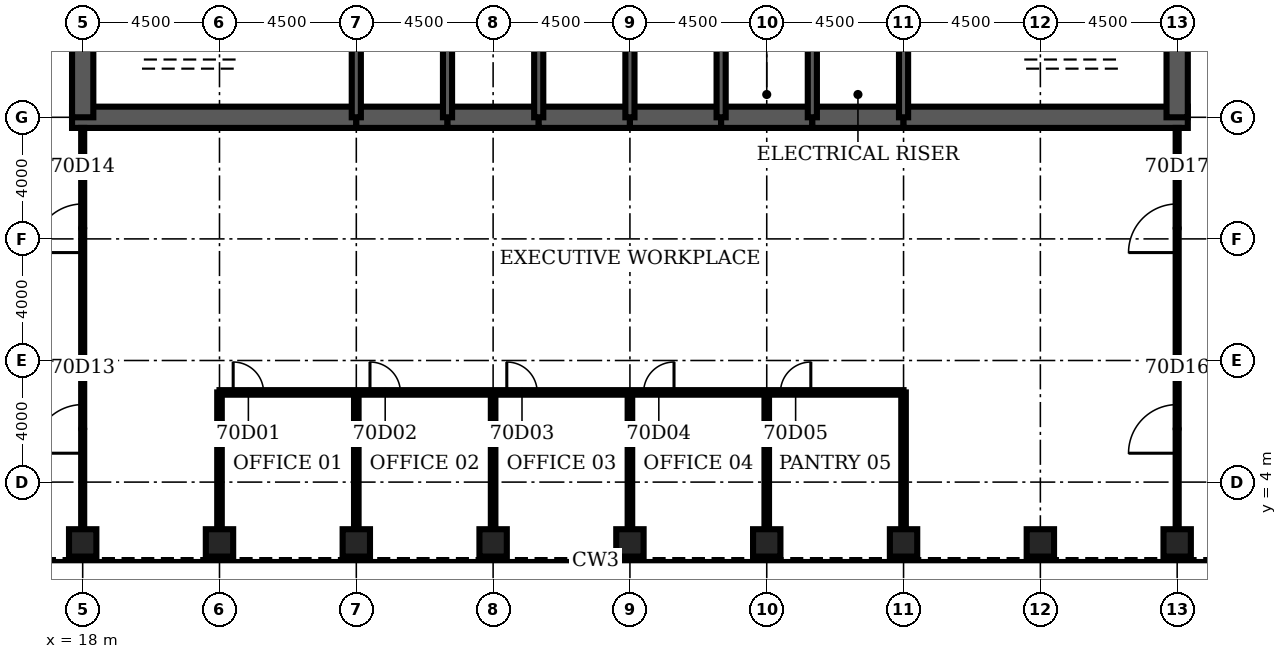
"""IFC4 building model, lengths in metres.
Left out: names, types, materials, properties, quantities, classifications, styles, units other than length and angle.
Written with IfcOpenShell. Run it as: python <this file> out.ifc"""

import sys

from ifc_helpers import new_model, si_unit, direction, frame, frame_2d, origin, origin_2d, place, context, subcontext, project, spatial, rectangle, hollow_rectangle, extrude, element, fill, save


model = new_model("IFC4")
c1 = context("Model", 3, precision=1e-05, world=origin(), true_north=direction((0.0, 1.0)))
c2 = subcontext(c1, "Body", "Model", "MODEL_VIEW")
j1 = project(units=[si_unit("LENGTHUNIT", "METRE"), si_unit("PLANEANGLEUNIT", "RADIAN")], contexts=[c1])
p1 = place(None, origin())
s1 = spatial("IfcSite", under=j1, at=p1, CompositionType="ELEMENT")
p2 = place(p1, origin())
s2 = spatial("IfcBuilding", under=s1, at=p2, CompositionType="ELEMENT")
p3 = place(p2, frame((0.0, 0.0, 308.9)))
s3 = spatial("IfcBuildingStorey", under=s2, at=p3, CompositionType="ELEMENT", Elevation=308.9)
for number, where, z_axis, x_axis in (
    (1, (18.0, 2.0, 0.0), (0.0, 0.0, 1.0), (0.0, 1.0, 0.0)),
    (2, (22.5, 2.0, 0.0), (0.0, 0.0, 1.0), (0.0, 1.0, 0.0)),
    (3, (27.0, 2.0, 0.0), (0.0, 0.0, 1.0), (0.0, 1.0, 0.0)),
    (4, (31.5, 2.0, 0.0), (0.0, 0.0, 1.0), (0.0, 1.0, 0.0)),
    (5, (36.0, 2.0, 0.0), (0.0, 0.0, 1.0), (0.0, 1.0, 0.0)),
    (6, (40.5, 2.0, 0.0), (0.0, 0.0, 1.0), (0.0, 1.0, 0.0)),
    (7, (45.0, 2.0, 0.0), (0.0, 0.0, 1.0), (0.0, 1.0, 0.0)),
    (8, (49.5, 2.0, 0.0), (0.0, 0.0, 1.0), (0.0, 1.0, 0.0)),
    (9, (54.0, 2.0, 0.0), (0.0, 0.0, 1.0), (0.0, 1.0, 0.0)),
):
    element("IfcColumn", number, at=place(p3, frame(where, z_axis=z_axis, x_axis=x_axis)), inside=s3, PredefinedType="COLUMN", context=c2, shape_type="SweptSolid", body=[
        extrude(hollow_rectangle(XDim=0.9, YDim=0.9, WallThickness=0.06, at=origin_2d()), origin(), (0.0, 0.0, 1.0), 4.2),
    ])
p4 = place(p3, frame((17.65, 16.0, 0.0), z_axis=(0.0, 0.0, 1.0), x_axis=(1.0, 0.0, 0.0)))
e10 = element("IfcWall", 10, at=p4, inside=s3, PredefinedType="SHEAR", context=c2, shape_type="SweptSolid", body=[
    extrude(rectangle(XDim=9.35, YDim=0.7, at=frame_2d((4.675, 0.0))), origin(), (0.0, 0.0, 1.0), 4.2),
])
for number, where, z_axis, x_axis in (
    (11, (27.0, 16.0, 0.0), (0.0, 0.0, 1.0), (1.0, 0.0, 0.0)),
    (12, (30.0, 16.0, 0.0), (0.0, 0.0, 1.0), (1.0, 0.0, 0.0)),
    (13, (33.0, 16.0, 0.0), (0.0, 0.0, 1.0), (1.0, 0.0, 0.0)),
    (14, (36.0, 16.0, 0.0), (0.0, 0.0, 1.0), (1.0, 0.0, 0.0)),
    (15, (39.0, 16.0, 0.0), (0.0, 0.0, 1.0), (1.0, 0.0, 0.0)),
    (16, (42.0, 16.0, 0.0), (0.0, 0.0, 1.0), (1.0, 0.0, 0.0)),
):
    element("IfcWall", number, at=place(p3, frame(where, z_axis=z_axis, x_axis=x_axis)), inside=s3, PredefinedType="SHEAR", context=c2, shape_type="SweptSolid", body=[
        extrude(rectangle(XDim=3.0, YDim=0.7, at=frame_2d((1.5, 0.0))), origin(), (0.0, 0.0, 1.0), 4.2),
    ])
p5 = place(p3, frame((45.0, 16.0, 0.0), z_axis=(0.0, 0.0, 1.0), x_axis=(1.0, 0.0, 0.0)))
e17 = element("IfcWall", 17, at=p5, inside=s3, PredefinedType="SHEAR", context=c2, shape_type="SweptSolid", body=[
    extrude(rectangle(XDim=9.35, YDim=0.7, at=frame_2d((4.675, 0.0))), origin(), (0.0, 0.0, 1.0), 4.2),
])
for number, where, z_axis, x_axis in (
    (18, (18.0, 19.2, 0.0), (0.0, 0.0, 1.0), (0.0, -1.0, 0.0)),
    (19, (54.0, 16.0, 0.0), (0.0, 0.0, 1.0), (0.0, 1.0, 0.0)),
):
    element("IfcWall", number, at=place(p3, frame(where, z_axis=z_axis, x_axis=x_axis)), inside=s3, PredefinedType="SHEAR", context=c2, shape_type="SweptSolid", body=[
        extrude(rectangle(XDim=3.2, YDim=0.7, at=frame_2d((1.6, 0.0))), origin(), (0.0, 0.0, 1.0), 4.2),
    ])
for number, where, z_axis, x_axis in (
    (20, (27.0, 16.0, 0.0), (0.0, 0.0, 1.0), (0.0, 1.0, 0.0)),
    (21, (30.0, 16.0, 0.0), (0.0, 0.0, 1.0), (0.0, 1.0, 0.0)),
    (22, (33.0, 16.0, 0.0), (0.0, 0.0, 1.0), (0.0, 1.0, 0.0)),
    (23, (36.0, 16.0, 0.0), (0.0, 0.0, 1.0), (0.0, 1.0, 0.0)),
    (24, (39.0, 16.0, 0.0), (0.0, 0.0, 1.0), (0.0, 1.0, 0.0)),
    (25, (42.0, 16.0, 0.0), (0.0, 0.0, 1.0), (0.0, 1.0, 0.0)),
    (26, (45.0, 16.0, 0.0), (0.0, 0.0, 1.0), (0.0, 1.0, 0.0)),
):
    element("IfcWall", number, at=place(p3, frame(where, z_axis=z_axis, x_axis=x_axis)), inside=s3, PredefinedType="SOLIDWALL", context=c2, shape_type="SweptSolid", body=[
        extrude(rectangle(XDim=3.2, YDim=0.3, at=frame_2d((1.6, 0.0))), origin(), (0.0, 0.0, 1.0), 4.2),
    ])
p6 = place(p3, frame((39.15, 17.3, 0.0), z_axis=(0.0, 0.0, 1.0), x_axis=(1.0, 0.0, 0.0)))
e27 = element("IfcWall", 27, at=p6, inside=s3, PredefinedType="SOLIDWALL", context=c2, shape_type="SweptSolid", body=[
    extrude(rectangle(XDim=2.7, YDim=0.3, at=frame_2d((1.35, 0.0))), origin(), (0.0, 0.0, 1.0), 4.04),
])
p7 = place(p6, frame((0.85, 0.0, 0.0)))
e28 = element("IfcOpeningElement", 28, at=p7, cuts=e27, PredefinedType="OPENING", context=c2, shape_type="SweptSolid", body=[
    extrude(rectangle(XDim=1.0, YDim=2.1, at=frame_2d((0.5, 1.05))), frame((0.0, 0.16, 0.0), z_axis=(0.0, -1.0, 0.0), x_axis=(1.0, 0.0, 0.0)), (0.0, 0.0, 1.0), 0.32),
])
p8 = place(p3, frame((42.15, 17.3, 0.0), z_axis=(0.0, 0.0, 1.0), x_axis=(1.0, 0.0, 0.0)))
e29 = element("IfcWall", 29, at=p8, inside=s3, PredefinedType="SOLIDWALL", context=c2, shape_type="SweptSolid", body=[
    extrude(rectangle(XDim=2.7, YDim=0.3, at=frame_2d((1.35, 0.0))), origin(), (0.0, 0.0, 1.0), 4.04),
])
p9 = place(p8, frame((0.85, 0.0, 0.0)))
e30 = element("IfcOpeningElement", 30, at=p9, cuts=e29, PredefinedType="OPENING", context=c2, shape_type="SweptSolid", body=[
    extrude(rectangle(XDim=1.0, YDim=2.1, at=frame_2d((0.5, 1.05))), frame((0.0, 0.16, 0.0), z_axis=(0.0, -1.0, 0.0), x_axis=(1.0, 0.0, 0.0)), (0.0, 0.0, 1.0), 0.32),
])
p10 = place(p3, frame((22.5, 6.95, 0.0), z_axis=(0.0, 0.0, 1.0), x_axis=(1.0, 0.0, 0.0)))
e31 = element("IfcWall", 31, at=p10, inside=s3, PredefinedType="PARTITIONING", context=c2, shape_type="SweptSolid", body=[
    extrude(rectangle(XDim=22.5, YDim=0.15, at=frame_2d((11.25, 0.0))), origin(), (0.0, 0.0, 1.0), 3.0),
])
p11 = place(p10, frame((0.45, 0.0, 0.0)))
e32 = element("IfcOpeningElement", 32, at=p11, cuts=e31, PredefinedType="OPENING", context=c2, shape_type="SweptSolid", body=[
    extrude(rectangle(XDim=1.0, YDim=2.1, at=frame_2d((0.5, 1.05))), frame((0.0, 0.085, 0.0), z_axis=(0.0, -1.0, 0.0), x_axis=(1.0, 0.0, 0.0)), (0.0, 0.0, 1.0), 0.17),
])
p12 = place(p10, frame((4.95, 0.0, 0.0)))
e33 = element("IfcOpeningElement", 33, at=p12, cuts=e31, PredefinedType="OPENING", context=c2, shape_type="SweptSolid", body=[
    extrude(rectangle(XDim=1.0, YDim=2.1, at=frame_2d((0.5, 1.05))), frame((0.0, 0.085, 0.0), z_axis=(0.0, -1.0, 0.0), x_axis=(1.0, 0.0, 0.0)), (0.0, 0.0, 1.0), 0.17),
])
p13 = place(p10, frame((9.45, 0.0, 0.0)))
e34 = element("IfcOpeningElement", 34, at=p13, cuts=e31, PredefinedType="OPENING", context=c2, shape_type="SweptSolid", body=[
    extrude(rectangle(XDim=1.0, YDim=2.1, at=frame_2d((0.5, 1.05))), frame((0.0, 0.085, 0.0), z_axis=(0.0, -1.0, 0.0), x_axis=(1.0, 0.0, 0.0)), (0.0, 0.0, 1.0), 0.17),
])
p14 = place(p10, frame((13.95, 0.0, 0.0)))
e35 = element("IfcOpeningElement", 35, at=p14, cuts=e31, PredefinedType="OPENING", context=c2, shape_type="SweptSolid", body=[
    extrude(rectangle(XDim=1.0, YDim=2.1, at=frame_2d((0.5, 1.05))), frame((0.0, 0.085, 0.0), z_axis=(0.0, -1.0, 0.0), x_axis=(1.0, 0.0, 0.0)), (0.0, 0.0, 1.0), 0.17),
])
p15 = place(p10, frame((18.45, 0.0, 0.0)))
e36 = element("IfcOpeningElement", 36, at=p15, cuts=e31, PredefinedType="OPENING", context=c2, shape_type="SweptSolid", body=[
    extrude(rectangle(XDim=1.0, YDim=2.1, at=frame_2d((0.5, 1.05))), frame((0.0, 0.085, 0.0), z_axis=(0.0, -1.0, 0.0), x_axis=(1.0, 0.0, 0.0)), (0.0, 0.0, 1.0), 0.17),
])
p16 = place(p3, frame((18.0, 2.45, 0.0), z_axis=(0.0, 0.0, 1.0), x_axis=(0.0, 1.0, 0.0)))
e37 = element("IfcWall", 37, at=p16, inside=s3, PredefinedType="PARTITIONING", context=c2, shape_type="SweptSolid", body=[
    extrude(rectangle(XDim=13.2, YDim=0.1, at=frame_2d((6.6, 0.0))), origin(), (0.0, 0.0, 1.0), 3.0),
])
p17 = place(p16, frame((2.5, 0.0, 0.0)))
e38 = element("IfcOpeningElement", 38, at=p17, cuts=e37, PredefinedType="OPENING", context=c2, shape_type="SweptSolid", body=[
    extrude(rectangle(XDim=1.6, YDim=2.1, at=frame_2d((0.8, 1.05))), frame((0.0, 0.06, 0.0), z_axis=(0.0, -1.0, 0.0), x_axis=(1.0, 0.0, 0.0)), (0.0, 0.0, 1.0), 0.12),
])
p18 = place(p16, frame((9.1, 0.0, 0.0)))
e39 = element("IfcOpeningElement", 39, at=p18, cuts=e37, PredefinedType="OPENING", context=c2, shape_type="SweptSolid", body=[
    extrude(rectangle(XDim=1.6, YDim=2.1, at=frame_2d((0.8, 1.05))), frame((0.0, 0.06, 0.0), z_axis=(0.0, -1.0, 0.0), x_axis=(1.0, 0.0, 0.0)), (0.0, 0.0, 1.0), 0.12),
])
for number, where, z_axis, x_axis in (
    (40, (22.5, 2.45, 0.0), (0.0, 0.0, 1.0), (0.0, 1.0, 0.0)),
    (41, (27.0, 2.45, 0.0), (0.0, 0.0, 1.0), (0.0, 1.0, 0.0)),
    (42, (31.5, 2.45, 0.0), (0.0, 0.0, 1.0), (0.0, 1.0, 0.0)),
    (43, (36.0, 2.45, 0.0), (0.0, 0.0, 1.0), (0.0, 1.0, 0.0)),
    (44, (40.5, 2.45, 0.0), (0.0, 0.0, 1.0), (0.0, 1.0, 0.0)),
    (45, (45.0, 2.45, 0.0), (0.0, 0.0, 1.0), (0.0, 1.0, 0.0)),
):
    element("IfcWall", number, at=place(p3, frame(where, z_axis=z_axis, x_axis=x_axis)), inside=s3, PredefinedType="PARTITIONING", context=c2, shape_type="SweptSolid", body=[
        extrude(rectangle(XDim=4.5, YDim=0.15, at=frame_2d((2.25, 0.0))), origin(), (0.0, 0.0, 1.0), 3.0),
    ])
p19 = place(p3, frame((54.0, 2.45, 0.0), z_axis=(0.0, 0.0, 1.0), x_axis=(0.0, 1.0, 0.0)))
e46 = element("IfcWall", 46, at=p19, inside=s3, PredefinedType="PARTITIONING", context=c2, shape_type="SweptSolid", body=[
    extrude(rectangle(XDim=13.2, YDim=0.1, at=frame_2d((6.6, 0.0))), origin(), (0.0, 0.0, 1.0), 3.0),
])
p20 = place(p19, frame((2.5, 0.0, 0.0)))
e47 = element("IfcOpeningElement", 47, at=p20, cuts=e46, PredefinedType="OPENING", context=c2, shape_type="SweptSolid", body=[
    extrude(rectangle(XDim=1.6, YDim=2.1, at=frame_2d((0.8, 1.05))), frame((0.0, 0.06, 0.0), z_axis=(0.0, -1.0, 0.0), x_axis=(1.0, 0.0, 0.0)), (0.0, 0.0, 1.0), 0.12),
])
p21 = place(p19, frame((9.1, 0.0, 0.0)))
e48 = element("IfcOpeningElement", 48, at=p21, cuts=e46, PredefinedType="OPENING", context=c2, shape_type="SweptSolid", body=[
    extrude(rectangle(XDim=1.6, YDim=2.1, at=frame_2d((0.8, 1.05))), frame((0.0, 0.06, 0.0), z_axis=(0.0, -1.0, 0.0), x_axis=(1.0, 0.0, 0.0)), (0.0, 0.0, 1.0), 0.12),
])
p22 = place(p7, origin())
e49 = element("IfcDoor", 49, at=p22, inside=s3, OperationType="SINGLE_SWING_LEFT", PredefinedType="DOOR", context=c2, shape_type="SweptSolid", body=[
    extrude(rectangle(XDim=1.0, YDim=2.1, at=frame_2d((0.5, 1.05))), frame((0.0, 0.025, 0.0), z_axis=(0.0, -1.0, 0.0), x_axis=(1.0, 0.0, 0.0)), (0.0, 0.0, 1.0), 0.05),
])
fill(e28, e49)
p23 = place(p9, origin())
e50 = element("IfcDoor", 50, at=p23, inside=s3, OperationType="SINGLE_SWING_LEFT", PredefinedType="DOOR", context=c2, shape_type="SweptSolid", body=[
    extrude(rectangle(XDim=1.0, YDim=2.1, at=frame_2d((0.5, 1.05))), frame((0.0, 0.025, 0.0), z_axis=(0.0, -1.0, 0.0), x_axis=(1.0, 0.0, 0.0)), (0.0, 0.0, 1.0), 0.05),
])
fill(e30, e50)
p24 = place(p11, origin())
e51 = element("IfcDoor", 51, at=p24, inside=s3, OperationType="SINGLE_SWING_LEFT", PredefinedType="DOOR", context=c2, shape_type="SweptSolid", body=[
    extrude(rectangle(XDim=1.0, YDim=2.1, at=frame_2d((0.5, 1.05))), frame((0.0, 0.025, 0.0), z_axis=(0.0, -1.0, 0.0), x_axis=(1.0, 0.0, 0.0)), (0.0, 0.0, 1.0), 0.05),
])
fill(e32, e51)
p25 = place(p12, origin())
e52 = element("IfcDoor", 52, at=p25, inside=s3, OperationType="SINGLE_SWING_LEFT", PredefinedType="DOOR", context=c2, shape_type="SweptSolid", body=[
    extrude(rectangle(XDim=1.0, YDim=2.1, at=frame_2d((0.5, 1.05))), frame((0.0, 0.025, 0.0), z_axis=(0.0, -1.0, 0.0), x_axis=(1.0, 0.0, 0.0)), (0.0, 0.0, 1.0), 0.05),
])
fill(e33, e52)
p26 = place(p13, origin())
e53 = element("IfcDoor", 53, at=p26, inside=s3, OperationType="SINGLE_SWING_LEFT", PredefinedType="DOOR", context=c2, shape_type="SweptSolid", body=[
    extrude(rectangle(XDim=1.0, YDim=2.1, at=frame_2d((0.5, 1.05))), frame((0.0, 0.025, 0.0), z_axis=(0.0, -1.0, 0.0), x_axis=(1.0, 0.0, 0.0)), (0.0, 0.0, 1.0), 0.05),
])
fill(e34, e53)
p27 = place(p14, origin())
e54 = element("IfcDoor", 54, at=p27, inside=s3, OperationType="SINGLE_SWING_RIGHT", PredefinedType="DOOR", context=c2, shape_type="SweptSolid", body=[
    extrude(rectangle(XDim=1.0, YDim=2.1, at=frame_2d((0.5, 1.05))), frame((0.0, 0.025, 0.0), z_axis=(0.0, -1.0, 0.0), x_axis=(1.0, 0.0, 0.0)), (0.0, 0.0, 1.0), 0.05),
])
fill(e35, e54)
p28 = place(p15, origin())
e55 = element("IfcDoor", 55, at=p28, inside=s3, OperationType="SINGLE_SWING_RIGHT", PredefinedType="DOOR", context=c2, shape_type="SweptSolid", body=[
    extrude(rectangle(XDim=1.0, YDim=2.1, at=frame_2d((0.5, 1.05))), frame((0.0, 0.025, 0.0), z_axis=(0.0, -1.0, 0.0), x_axis=(1.0, 0.0, 0.0)), (0.0, 0.0, 1.0), 0.05),
])
fill(e36, e55)
p29 = place(p17, origin())
e56 = element("IfcDoor", 56, at=p29, inside=s3, OperationType="SINGLE_SWING_LEFT", PredefinedType="DOOR", context=c2, shape_type="SweptSolid", body=[
    extrude(rectangle(XDim=1.6, YDim=2.1, at=frame_2d((0.8, 1.05))), frame((0.0, 0.025, 0.0), z_axis=(0.0, -1.0, 0.0), x_axis=(1.0, 0.0, 0.0)), (0.0, 0.0, 1.0), 0.05),
])
fill(e38, e56)
p30 = place(p18, origin())
e57 = element("IfcDoor", 57, at=p30, inside=s3, OperationType="SINGLE_SWING_LEFT", PredefinedType="DOOR", context=c2, shape_type="SweptSolid", body=[
    extrude(rectangle(XDim=1.6, YDim=2.1, at=frame_2d((0.8, 1.05))), frame((0.0, 0.025, 0.0), z_axis=(0.0, -1.0, 0.0), x_axis=(1.0, 0.0, 0.0)), (0.0, 0.0, 1.0), 0.05),
])
fill(e39, e57)
p31 = place(p20, origin())
e58 = element("IfcDoor", 58, at=p31, inside=s3, OperationType="SINGLE_SWING_LEFT", PredefinedType="DOOR", context=c2, shape_type="SweptSolid", body=[
    extrude(rectangle(XDim=1.6, YDim=2.1, at=frame_2d((0.8, 1.05))), frame((0.0, 0.025, 0.0), z_axis=(0.0, -1.0, 0.0), x_axis=(1.0, 0.0, 0.0)), (0.0, 0.0, 1.0), 0.05),
])
fill(e47, e58)
p32 = place(p21, origin())
e59 = element("IfcDoor", 59, at=p32, inside=s3, OperationType="SINGLE_SWING_LEFT", PredefinedType="DOOR", context=c2, shape_type="SweptSolid", body=[
    extrude(rectangle(XDim=1.6, YDim=2.1, at=frame_2d((0.8, 1.05))), frame((0.0, 0.025, 0.0), z_axis=(0.0, -1.0, 0.0), x_axis=(1.0, 0.0, 0.0)), (0.0, 0.0, 1.0), 0.05),
])
fill(e48, e59)
save(model, sys.argv[1])
